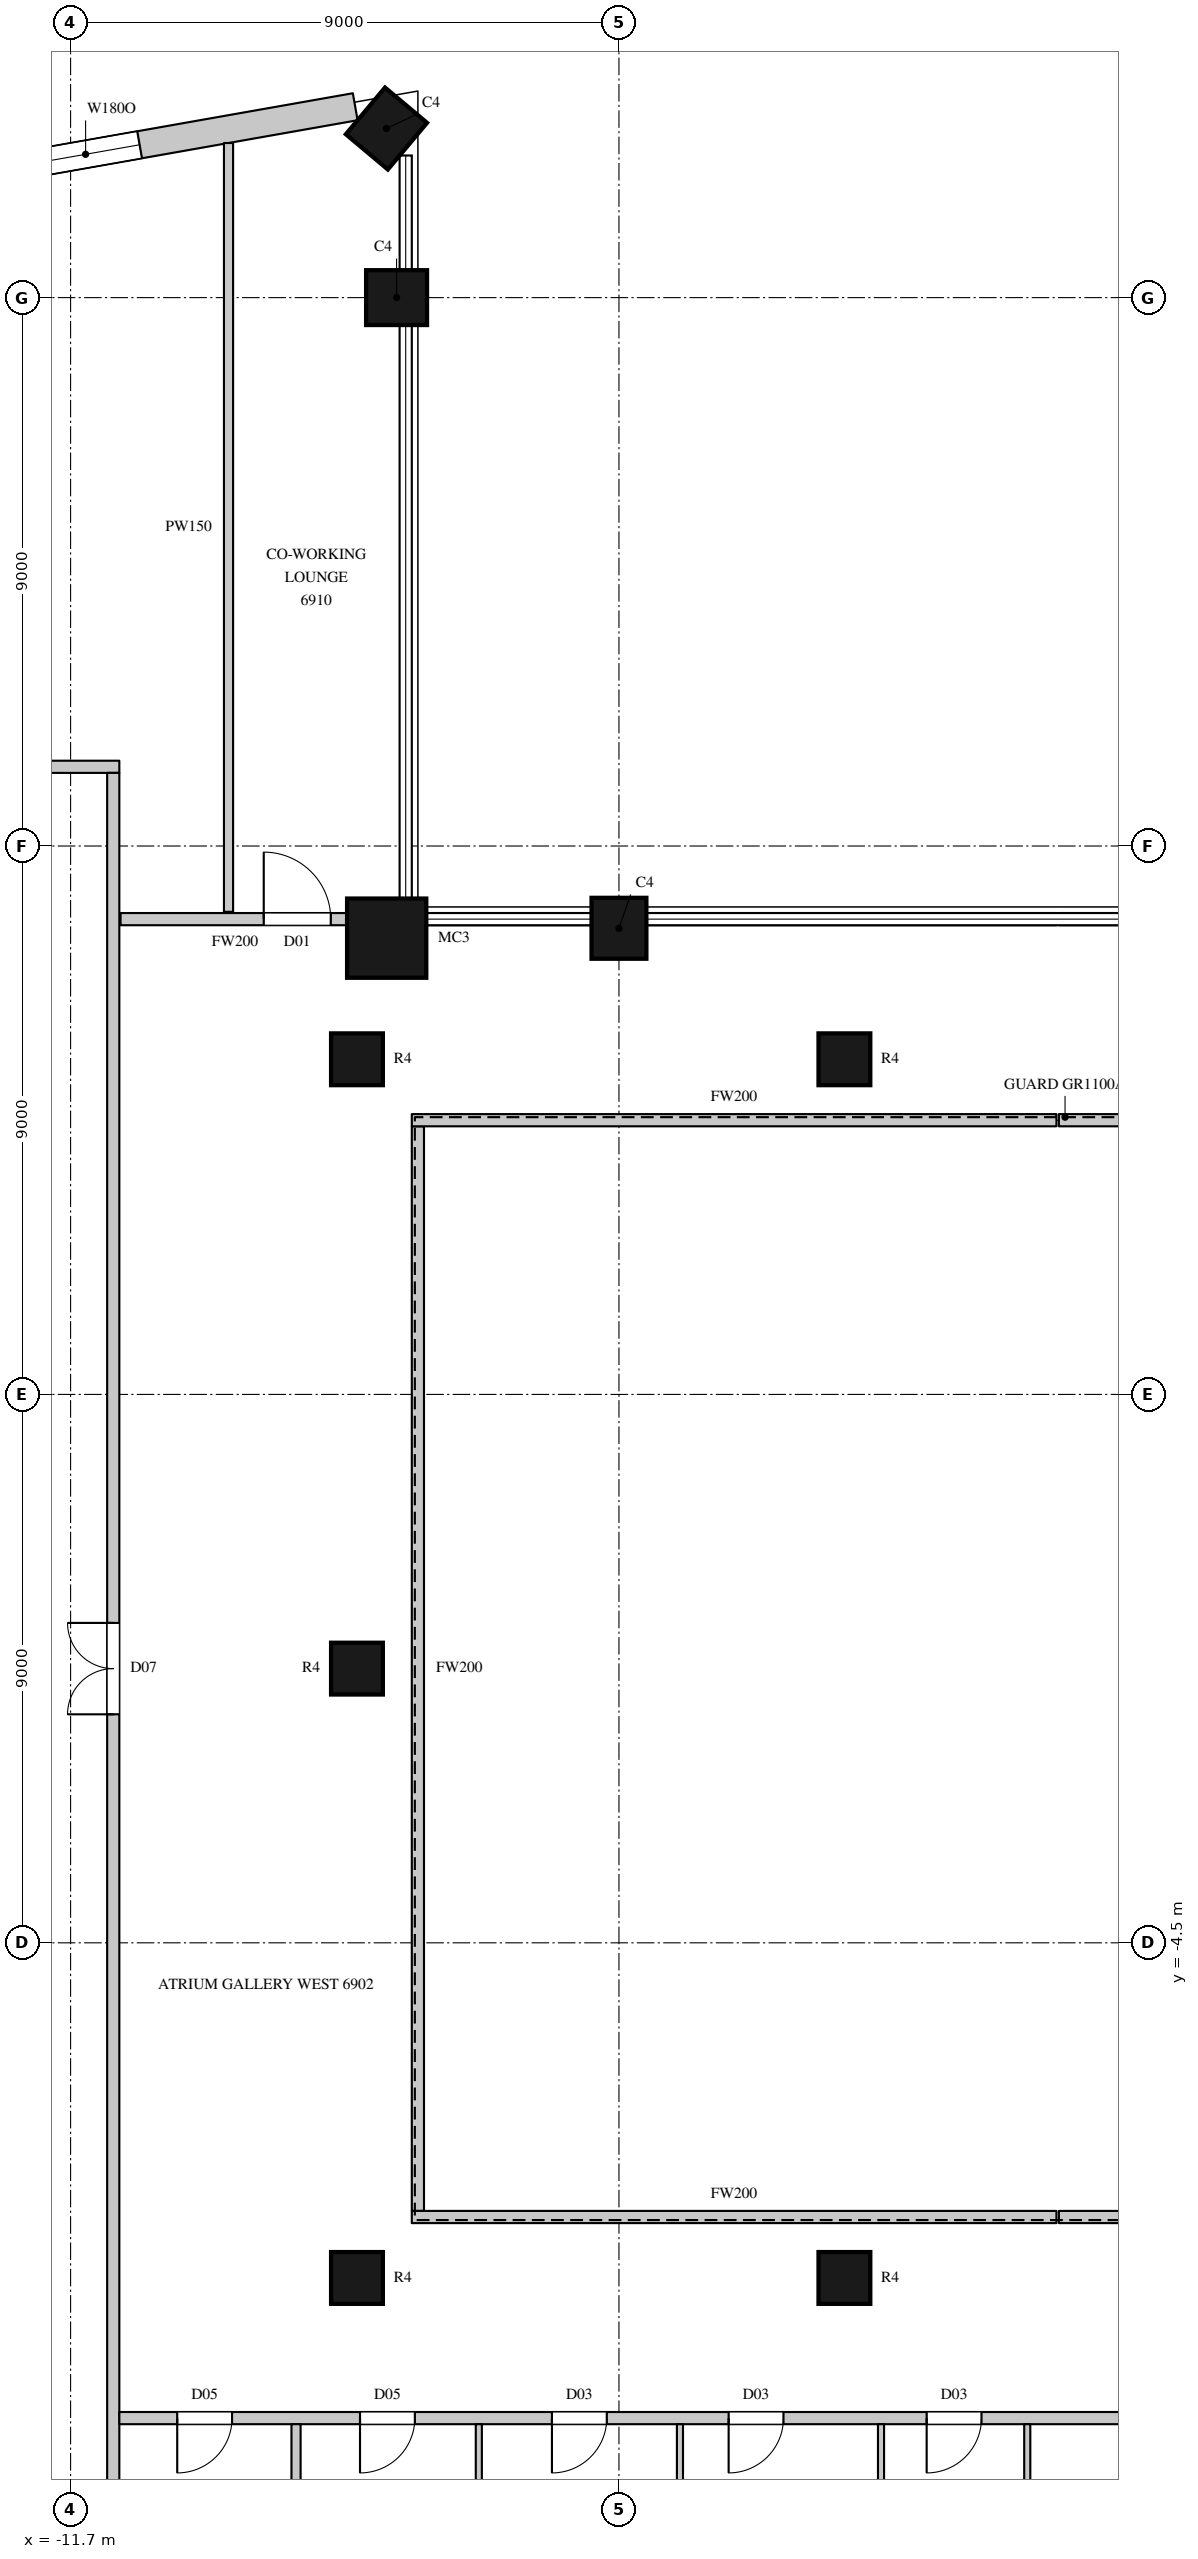
"""IFC4 building model, lengths in metres.
Left out: names, types, materials, properties, quantities, classifications, styles, units other than length and angle.
Written with IfcOpenShell. Run it as: python <this file> out.ifc"""

import sys

from ifc_helpers import new_model, si_unit, direction, frame, frame_2d, origin, origin_2d, place, context, subcontext, project, spatial, rectangle, circle, extrude, element, fill, save


model = new_model("IFC4")
c1 = context("Model", 3, precision=1e-05, world=origin(), true_north=direction((0.0, 1.0)))
c2 = subcontext(c1, "Body", "Model", "MODEL_VIEW")
j1 = project(units=[si_unit("LENGTHUNIT", "METRE"), si_unit("PLANEANGLEUNIT", "RADIAN")], contexts=[c1])
p1 = place(None, origin())
s1 = spatial("IfcSite", under=j1, at=p1, CompositionType="ELEMENT")
p2 = place(p1, origin())
s2 = spatial("IfcBuilding", under=s1, at=p2, CompositionType="ELEMENT")
p3 = place(p2, frame((0.0, 0.0, 304.9)))
s3 = spatial("IfcBuildingStorey", under=s2, at=p3, CompositionType="ELEMENT", Elevation=304.9)
p4 = place(p3, frame((-2.7, 12.15, 0.0), z_axis=(0.0, 0.0, 1.0), x_axis=(-1.0, 0.0, 0.0)))
e1 = element("IfcColumn", 1, at=p4, inside=s3, PredefinedType="COLUMN", context=c2, shape_type="SweptSolid", body=[
    extrude(rectangle(XDim=0.9, YDim=1.0, at=origin_2d()), origin(), (0.0, 0.0, 1.0), 4.1),
])
p5 = place(p3, frame((-6.512, 11.988, 0.0), z_axis=(0.0, 0.0, 1.0), x_axis=(1.0, 0.0, 0.0)))
e2 = element("IfcColumn", 2, at=p5, inside=s3, PredefinedType="COLUMN", context=c2, shape_type="SweptSolid", body=[
    extrude(circle(Radius=0.65, at=origin_2d()), origin(), (0.0, 0.0, 1.0), 4.1),
])
for number, where, z_axis, x_axis in (
    (3, (-6.35, 22.5, 0.0), (0.0, 0.0, 1.0), (0.0, 1.0, 0.0)),
    (4, (-6.516, 25.275, 0.0), (0.0, 0.0, 1.0), (-0.766, 0.643, 0.0)),
):
    element("IfcColumn", number, at=place(p3, frame(where, z_axis=z_axis, x_axis=x_axis)), inside=s3, PredefinedType="COLUMN", context=c2, shape_type="SweptSolid", body=[
        extrude(rectangle(XDim=0.9, YDim=1.0, at=origin_2d()), origin(), (0.0, 0.0, 1.0), 4.1),
    ])
for number, where, z_axis, x_axis in (
    (5, (-7.0, -10.0, 0.0), (0.0, 0.0, 1.0), (1.0, 0.0, 0.0)),
    (6, (-7.0, 0.0, 0.0), (0.0, 0.0, 1.0), (1.0, 0.0, 0.0)),
    (7, (-7.0, 10.0, 0.0), (0.0, 0.0, 1.0), (1.0, 0.0, 0.0)),
    (8, (1.0, -10.0, 0.0), (0.0, 0.0, 1.0), (1.0, 0.0, 0.0)),
    (9, (1.0, 10.0, 0.0), (0.0, 0.0, 1.0), (1.0, 0.0, 0.0)),
):
    element("IfcColumn", number, at=place(p3, frame(where, z_axis=z_axis, x_axis=x_axis)), inside=s3, PredefinedType="COLUMN", context=c2, shape_type="SweptSolid", body=[
        extrude(circle(Radius=0.425, at=origin_2d()), origin(), (0.0, 0.0, 1.0), 4.1),
    ])
p6 = place(p3, frame((-7.029, 25.632, 0.0), z_axis=(0.0, 0.0, 1.0), x_axis=(-0.984797606634, -0.173705710808, 0.0)))
e10 = element("IfcWall", 10, at=p6, inside=s3, PredefinedType="SOLIDWALL", context=c2, shape_type="SweptSolid", body=[
    extrude(rectangle(XDim=5.772, YDim=0.45, at=frame_2d((2.886, 0.0))), origin(), (0.0, 0.0, 1.0), 3.8),
])
p7 = place(p6, frame((3.593, 0.0, 1.05)))
e11 = element("IfcOpeningElement", 11, at=p7, cuts=e10, PredefinedType="OPENING", context=c2, shape_type="SweptSolid", body=[
    extrude(rectangle(XDim=1.8, YDim=2.4, at=frame_2d((0.9, 1.2))), frame((0.0, 0.235, 0.0), z_axis=(0.0, -1.0, 0.0), x_axis=(1.0, 0.0, 0.0)), (0.0, 0.0, 1.0), 0.47),
])
p8 = place(p3, frame((-13.97, 14.8, 0.0), z_axis=(0.0, 0.0, 1.0), x_axis=(1.0, 0.0, 0.0)))
e12 = element("IfcWall", 12, at=p8, inside=s3, PredefinedType="PARTITIONING", context=c2, shape_type="SweptSolid", body=[
    extrude(rectangle(XDim=3.07, YDim=0.2, at=frame_2d((1.535, 0.0))), origin(), (0.0, 0.0, 1.0), 3.8),
])
p9 = place(p3, frame((-11.0, -14.8, 0.0), z_axis=(0.0, 0.0, 1.0), x_axis=(0.0, 1.0, 0.0)))
e13 = element("IfcWall", 13, at=p9, inside=s3, PredefinedType="PARTITIONING", context=c2, shape_type="SweptSolid", body=[
    extrude(rectangle(XDim=29.5, YDim=0.2, at=frame_2d((14.75, 0.0))), origin(), (0.0, 0.0, 1.0), 3.8),
])
p10 = place(p9, frame((14.05, 0.0, 0.0)))
e14 = element("IfcOpeningElement", 14, at=p10, cuts=e13, PredefinedType="OPENING", context=c2, shape_type="SweptSolid", body=[
    extrude(rectangle(XDim=1.5, YDim=2.4, at=frame_2d((0.75, 1.2))), frame((0.0, 0.11, 0.0), z_axis=(0.0, -1.0, 0.0), x_axis=(1.0, 0.0, 0.0)), (0.0, 0.0, 1.0), 0.22),
])
p11 = place(p3, frame((-10.9, -12.3, 0.0), z_axis=(0.0, 0.0, 1.0), x_axis=(1.0, 0.0, 0.0)))
e15 = element("IfcWall", 15, at=p11, inside=s3, PredefinedType="PARTITIONING", context=c2, shape_type="SweptSolid", body=[
    extrude(rectangle(XDim=22.1, YDim=0.2, at=frame_2d((11.05, 0.0))), origin(), (0.0, 0.0, 1.0), 3.8),
])
p12 = place(p11, frame((0.95, 0.0, 0.0)))
e16 = element("IfcOpeningElement", 16, at=p12, cuts=e15, PredefinedType="OPENING", context=c2, shape_type="SweptSolid", body=[
    extrude(rectangle(XDim=0.9, YDim=2.2, at=frame_2d((0.45, 1.1))), frame((0.0, 0.11, 0.0), z_axis=(0.0, -1.0, 0.0), x_axis=(1.0, 0.0, 0.0)), (0.0, 0.0, 1.0), 0.22),
])
p13 = place(p11, frame((3.95, 0.0, 0.0)))
e17 = element("IfcOpeningElement", 17, at=p13, cuts=e15, PredefinedType="OPENING", context=c2, shape_type="SweptSolid", body=[
    extrude(rectangle(XDim=0.9, YDim=2.2, at=frame_2d((0.45, 1.1))), frame((0.0, 0.11, 0.0), z_axis=(0.0, -1.0, 0.0), x_axis=(1.0, 0.0, 0.0)), (0.0, 0.0, 1.0), 0.22),
])
p14 = place(p11, frame((7.1, 0.0, 0.0)))
e18 = element("IfcOpeningElement", 18, at=p14, cuts=e15, PredefinedType="OPENING", context=c2, shape_type="SweptSolid", body=[
    extrude(rectangle(XDim=0.9, YDim=2.2, at=frame_2d((0.45, 1.1))), frame((0.0, 0.11, 0.0), z_axis=(0.0, -1.0, 0.0), x_axis=(1.0, 0.0, 0.0)), (0.0, 0.0, 1.0), 0.22),
])
p15 = place(p11, frame((10.0, 0.0, 0.0)))
e19 = element("IfcOpeningElement", 19, at=p15, cuts=e15, PredefinedType="OPENING", context=c2, shape_type="SweptSolid", body=[
    extrude(rectangle(XDim=0.9, YDim=2.2, at=frame_2d((0.45, 1.1))), frame((0.0, 0.11, 0.0), z_axis=(0.0, -1.0, 0.0), x_axis=(1.0, 0.0, 0.0)), (0.0, 0.0, 1.0), 0.22),
])
p16 = place(p11, frame((13.25, 0.0, 0.0)))
e20 = element("IfcOpeningElement", 20, at=p16, cuts=e15, PredefinedType="OPENING", context=c2, shape_type="SweptSolid", body=[
    extrude(rectangle(XDim=0.9, YDim=2.2, at=frame_2d((0.45, 1.1))), frame((0.0, 0.11, 0.0), z_axis=(0.0, -1.0, 0.0), x_axis=(1.0, 0.0, 0.0)), (0.0, 0.0, 1.0), 0.22),
])
p17 = place(p11, frame((16.85, 0.0, 0.0)))
e21 = element("IfcOpeningElement", 21, at=p17, cuts=e15, PredefinedType="OPENING", context=c2, shape_type="SweptSolid", body=[
    extrude(rectangle(XDim=1.1, YDim=2.4, at=frame_2d((0.55, 1.2))), frame((0.0, 0.11, 0.0), z_axis=(0.0, -1.0, 0.0), x_axis=(1.0, 0.0, 0.0)), (0.0, 0.0, 1.0), 0.22),
])
p18 = place(p3, frame((-10.88, 12.3, 0.0), z_axis=(0.0, 0.0, 1.0), x_axis=(1.0, 0.0, 0.0)))
e22 = element("IfcWall", 22, at=p18, inside=s3, PredefinedType="PARTITIONING", context=c2, shape_type="SweptSolid", body=[
    extrude(rectangle(XDim=3.761, YDim=0.2, at=frame_2d((1.881, 0.0))), origin(), (0.0, 0.0, 1.0), 3.8),
])
p19 = place(p18, frame((2.35, 0.0, 0.0)))
e23 = element("IfcOpeningElement", 23, at=p19, cuts=e22, PredefinedType="OPENING", context=c2, shape_type="SweptSolid", body=[
    extrude(rectangle(XDim=1.1, YDim=2.4, at=frame_2d((0.55, 1.2))), frame((0.0, 0.11, 0.0), z_axis=(0.0, -1.0, 0.0), x_axis=(1.0, 0.0, 0.0)), (0.0, 0.0, 1.0), 0.22),
])
p20 = place(p3, frame((-5.906, 12.3, 0.0), z_axis=(0.0, 0.0, 1.0), x_axis=(1.0, 0.0, 0.0)))
e24 = element("IfcWall", 24, at=p20, inside=s3, PredefinedType="PARTITIONING", context=c2, shape_type="SweptSolid", body=[
    extrude(rectangle(XDim=2.756, YDim=0.2, at=frame_2d((1.378, 0.0))), origin(), (0.0, 0.0, 1.0), 3.8),
])
p21 = place(p3, frame((-2.25, 12.3, 0.0), z_axis=(0.0, 0.0, 1.0), x_axis=(1.0, 0.0, 0.0)))
e25 = element("IfcWall", 25, at=p21, inside=s3, PredefinedType="PARTITIONING", context=c2, shape_type="SweptSolid", body=[
    extrude(rectangle(XDim=6.73, YDim=0.2, at=frame_2d((3.365, 0.0))), origin(), (0.0, 0.0, 1.0), 3.8),
])
p22 = place(p3, frame((-6.0, -8.9, 0.0), z_axis=(0.0, 0.0, 1.0), x_axis=(0.0, 1.0, 0.0)))
e26 = element("IfcWall", 26, at=p22, inside=s3, PredefinedType="PARTITIONING", context=c2, shape_type="SweptSolid", body=[
    extrude(rectangle(XDim=17.8, YDim=0.2, at=frame_2d((8.9, 0.0))), origin(), (0.0, 0.0, 1.0), 3.8),
])
for number, where, z_axis, x_axis in (
    (27, (-6.1, -9.0, 0.0), (0.0, 0.0, 1.0), (1.0, 0.0, 0.0)),
    (28, (-6.1, 9.0, 0.0), (0.0, 0.0, 1.0), (1.0, 0.0, 0.0)),
):
    element("IfcWall", number, at=place(p3, frame(where, z_axis=z_axis, x_axis=x_axis)), inside=s3, PredefinedType="PARTITIONING", context=c2, shape_type="SweptSolid", body=[
        extrude(rectangle(XDim=10.58, YDim=0.2, at=frame_2d((5.29, 0.0))), origin(), (0.0, 0.0, 1.0), 3.8),
    ])
for number, where, z_axis, x_axis in (
    (29, (4.52, -9.0, 0.0), (0.0, 0.0, 1.0), (1.0, 0.0, 0.0)),
    (30, (4.52, 9.0, 0.0), (0.0, 0.0, 1.0), (1.0, 0.0, 0.0)),
):
    element("IfcWall", number, at=place(p3, frame(where, z_axis=z_axis, x_axis=x_axis)), inside=s3, PredefinedType="PARTITIONING", context=c2, shape_type="SweptSolid", body=[
        extrude(rectangle(XDim=3.58, YDim=0.2, at=frame_2d((1.79, 0.0))), origin(), (0.0, 0.0, 1.0), 3.8),
    ])
p23 = place(p3, frame((4.52, 12.3, 0.0), z_axis=(0.0, 0.0, 1.0), x_axis=(1.0, 0.0, 0.0)))
e31 = element("IfcWall", 31, at=p23, inside=s3, PredefinedType="PARTITIONING", context=c2, shape_type="SweptSolid", body=[
    extrude(rectangle(XDim=1.33, YDim=0.2, at=frame_2d((0.665, 0.0))), origin(), (0.0, 0.0, 1.0), 3.8),
])
p24 = place(p3, frame((-9.108, 12.42, 0.0), z_axis=(0.0, 0.0, 1.0), x_axis=(0.0, 1.0, 0.0)))
e32 = element("IfcWall", 32, at=p24, inside=s3, PredefinedType="PARTITIONING", context=c2, shape_type="SweptSolid", body=[
    extrude(rectangle(XDim=12.617, YDim=0.15, at=frame_2d((6.309, 0.0))), origin(), (0.0, 0.0, 1.0), 3.8),
])
p25 = place(p3, frame((-8.0, -24.04, 0.0), z_axis=(0.0, 0.0, 1.0), x_axis=(0.0, 1.0, 0.0)))
e33 = element("IfcWall", 33, at=p25, inside=s3, PredefinedType="PARTITIONING", context=c2, shape_type="SweptSolid", body=[
    extrude(rectangle(XDim=11.64, YDim=0.15, at=frame_2d((5.82, 0.0))), origin(), (0.0, 0.0, 1.0), 3.8),
])
p26 = place(p3, frame((-5.0, -24.04, 0.0), z_axis=(0.0, 0.0, 1.0), x_axis=(0.0, 1.0, 0.0)))
e34 = element("IfcWall", 34, at=p26, inside=s3, PredefinedType="PARTITIONING", context=c2, shape_type="SweptSolid", body=[
    extrude(rectangle(XDim=11.64, YDim=0.1, at=frame_2d((5.82, 0.0))), origin(), (0.0, 0.0, 1.0), 3.8),
])
p27 = place(p3, frame((-1.699, -23.421, 0.0), z_axis=(0.0, 0.0, 1.0), x_axis=(0.0, 1.0, 0.0)))
e35 = element("IfcWall", 35, at=p27, inside=s3, PredefinedType="PARTITIONING", context=c2, shape_type="SweptSolid", body=[
    extrude(rectangle(XDim=11.021, YDim=0.1, at=frame_2d((5.511, 0.0))), origin(), (0.0, 0.0, 1.0), 3.8),
])
p28 = place(p3, frame((1.601, -23.412, 0.0), z_axis=(0.0, 0.0, 1.0), x_axis=(0.0, 1.0, 0.0)))
e36 = element("IfcWall", 36, at=p28, inside=s3, PredefinedType="PARTITIONING", context=c2, shape_type="SweptSolid", body=[
    extrude(rectangle(XDim=11.012, YDim=0.1, at=frame_2d((5.506, 0.0))), origin(), (0.0, 0.0, 1.0), 3.8),
])
p29 = place(p3, frame((4.001, -22.999, 0.0), z_axis=(0.0, 0.0, 1.0), x_axis=(0.0, 1.0, 0.0)))
e37 = element("IfcWall", 37, at=p29, inside=s3, PredefinedType="PARTITIONING", context=c2, shape_type="SweptSolid", body=[
    extrude(rectangle(XDim=10.599, YDim=0.1, at=frame_2d((5.3, 0.0))), origin(), (0.0, 0.0, 1.0), 3.8),
])
p30 = place(p7, origin())
e38 = element("IfcWindow", 38, at=p30, inside=s3, PartitioningType="SINGLE_PANEL", PredefinedType="WINDOW", context=c2, shape_type="SweptSolid", body=[
    extrude(rectangle(XDim=1.8, YDim=2.4, at=frame_2d((0.9, 1.2))), frame((0.0, 0.135, 0.0), z_axis=(0.0, -1.0, 0.0), x_axis=(1.0, 0.0, 0.0)), (0.0, 0.0, 1.0), 0.06),
])
fill(e11, e38)
p31 = place(p10, origin())
e39 = element("IfcDoor", 39, at=p31, inside=s3, OperationType="DOUBLE_DOOR_SINGLE_SWING", PredefinedType="DOOR", context=c2, shape_type="SweptSolid", body=[
    extrude(rectangle(XDim=1.5, YDim=2.4, at=frame_2d((0.75, 1.2))), frame((0.0, 0.025, 0.0), z_axis=(0.0, -1.0, 0.0), x_axis=(1.0, 0.0, 0.0)), (0.0, 0.0, 1.0), 0.05),
])
fill(e14, e39)
p32 = place(p12, origin())
e40 = element("IfcDoor", 40, at=p32, inside=s3, OperationType="SINGLE_SWING_RIGHT", PredefinedType="DOOR", context=c2, shape_type="SweptSolid", body=[
    extrude(rectangle(XDim=0.9, YDim=2.2, at=frame_2d((0.45, 1.1))), frame((0.0, 0.025, 0.0), z_axis=(0.0, -1.0, 0.0), x_axis=(1.0, 0.0, 0.0)), (0.0, 0.0, 1.0), 0.05),
])
fill(e16, e40)
p33 = place(p13, origin())
e41 = element("IfcDoor", 41, at=p33, inside=s3, OperationType="SINGLE_SWING_RIGHT", PredefinedType="DOOR", context=c2, shape_type="SweptSolid", body=[
    extrude(rectangle(XDim=0.9, YDim=2.2, at=frame_2d((0.45, 1.1))), frame((0.0, 0.025, 0.0), z_axis=(0.0, -1.0, 0.0), x_axis=(1.0, 0.0, 0.0)), (0.0, 0.0, 1.0), 0.05),
])
fill(e17, e41)
p34 = place(p14, origin())
e42 = element("IfcDoor", 42, at=p34, inside=s3, OperationType="SINGLE_SWING_RIGHT", PredefinedType="DOOR", context=c2, shape_type="SweptSolid", body=[
    extrude(rectangle(XDim=0.9, YDim=2.2, at=frame_2d((0.45, 1.1))), frame((0.0, 0.025, 0.0), z_axis=(0.0, -1.0, 0.0), x_axis=(1.0, 0.0, 0.0)), (0.0, 0.0, 1.0), 0.05),
])
fill(e18, e42)
p35 = place(p15, origin())
e43 = element("IfcDoor", 43, at=p35, inside=s3, OperationType="SINGLE_SWING_RIGHT", PredefinedType="DOOR", context=c2, shape_type="SweptSolid", body=[
    extrude(rectangle(XDim=0.9, YDim=2.2, at=frame_2d((0.45, 1.1))), frame((0.0, 0.025, 0.0), z_axis=(0.0, -1.0, 0.0), x_axis=(1.0, 0.0, 0.0)), (0.0, 0.0, 1.0), 0.05),
])
fill(e19, e43)
p36 = place(p16, origin())
e44 = element("IfcDoor", 44, at=p36, inside=s3, OperationType="SINGLE_SWING_RIGHT", PredefinedType="DOOR", context=c2, shape_type="SweptSolid", body=[
    extrude(rectangle(XDim=0.9, YDim=2.2, at=frame_2d((0.45, 1.1))), frame((0.0, 0.025, 0.0), z_axis=(0.0, -1.0, 0.0), x_axis=(1.0, 0.0, 0.0)), (0.0, 0.0, 1.0), 0.05),
])
fill(e20, e44)
p37 = place(p19, origin())
e45 = element("IfcDoor", 45, at=p37, inside=s3, OperationType="SINGLE_SWING_LEFT", PredefinedType="DOOR", context=c2, shape_type="SweptSolid", body=[
    extrude(rectangle(XDim=1.1, YDim=2.4, at=frame_2d((0.55, 1.2))), frame((0.0, 0.025, 0.0), z_axis=(0.0, -1.0, 0.0), x_axis=(1.0, 0.0, 0.0)), (0.0, 0.0, 1.0), 0.05),
])
fill(e23, e45)
save(model, sys.argv[1])
